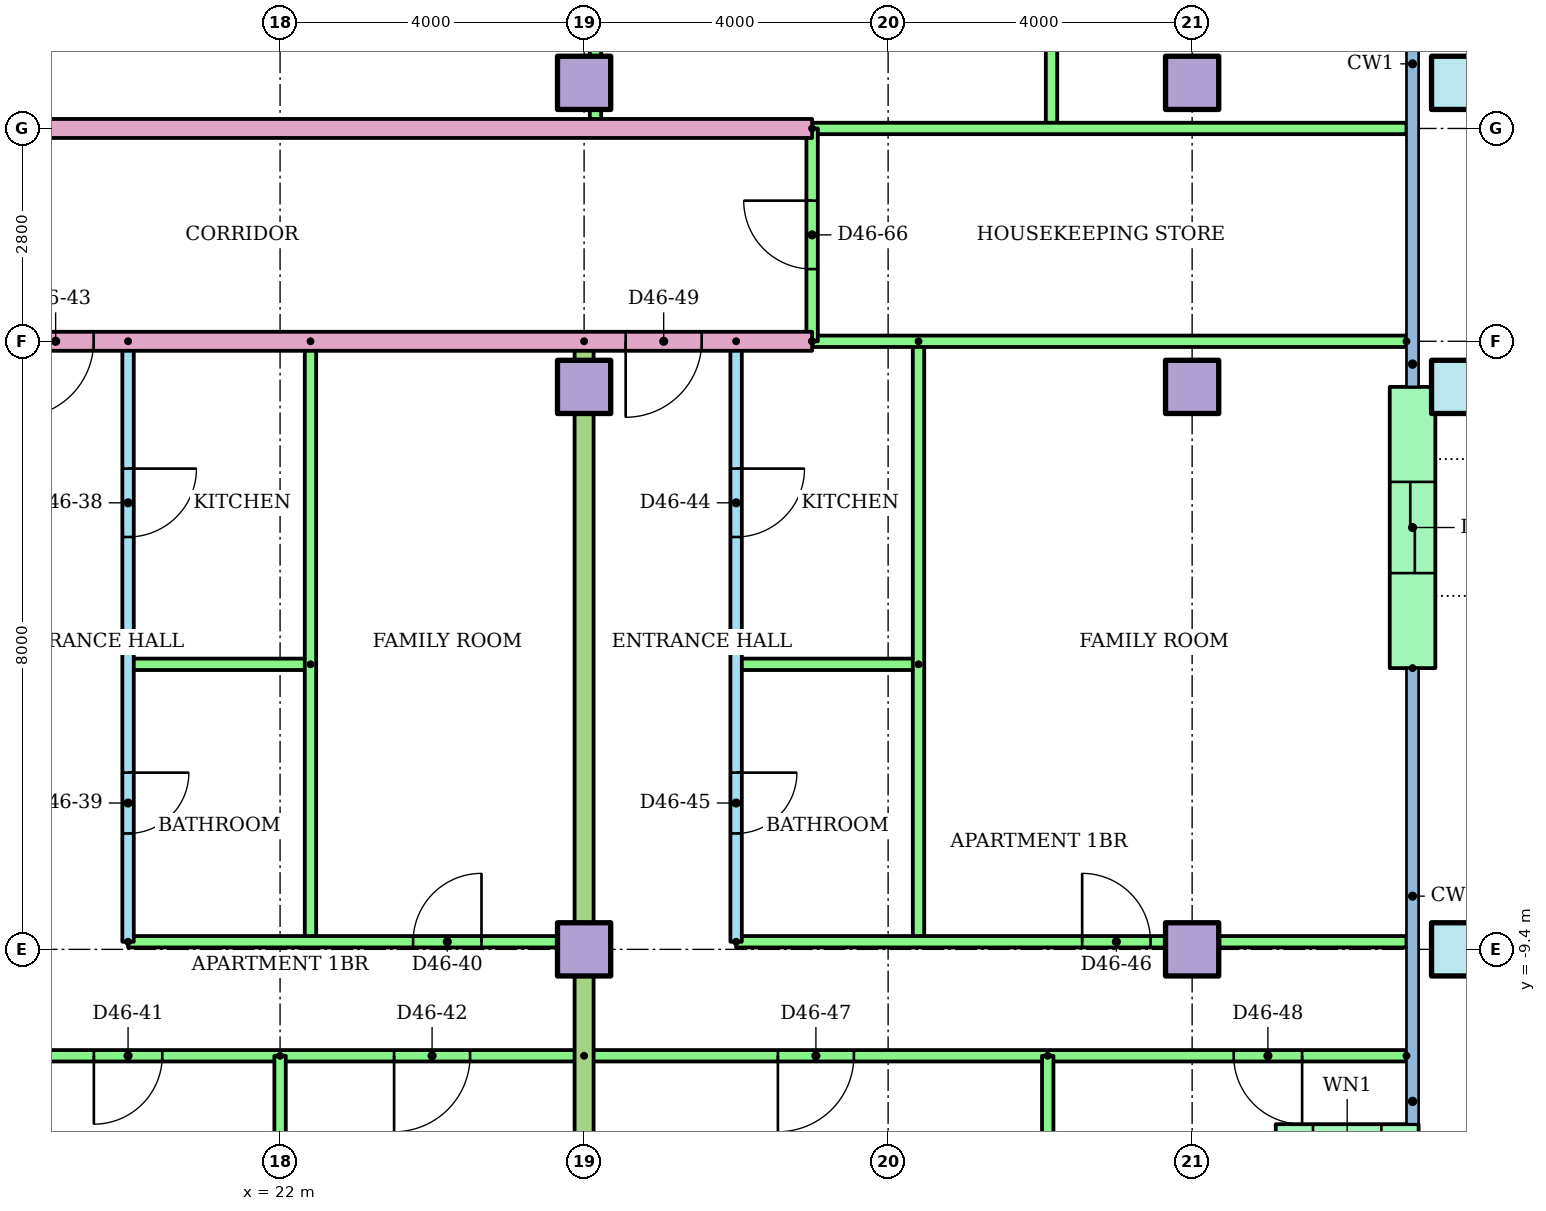
"""IFC4 building model, lengths in metres.
Left out: names, types, materials, properties, quantities, classifications, styles, units other than length and angle.
Written with IfcOpenShell. Run it as: python <this file> out.ifc"""

import sys

from ifc_helpers import new_model, si_unit, direction, frame, frame_2d, origin, origin_2d, place, context, subcontext, project, spatial, rectangle, hollow_rectangle, extrude, element, fill, save


model = new_model("IFC4")
c1 = context("Model", 3, precision=1e-05, world=origin(), true_north=direction((0.0, 1.0)))
c2 = subcontext(c1, "Body", "Model", "MODEL_VIEW")
j1 = project(units=[si_unit("LENGTHUNIT", "METRE"), si_unit("PLANEANGLEUNIT", "RADIAN")], contexts=[c1])
p1 = place(None, origin())
s1 = spatial("IfcSite", under=j1, at=p1, CompositionType="ELEMENT")
p2 = place(p1, origin())
s2 = spatial("IfcBuilding", under=s1, at=p2, CompositionType="ELEMENT")
p3 = place(p2, frame((0.0, 0.0, 178.1)))
s3 = spatial("IfcBuildingStorey", under=s2, at=p3, CompositionType="ELEMENT", Elevation=178.1)
for number, where in (
    (1, (26.0, -9.4, 0.0)),
    (2, (34.0, -9.4, 0.0)),
):
    element("IfcColumn", number, at=place(p3, frame(where)), inside=s3, PredefinedType="COLUMN", context=c2, shape_type="SweptSolid", body=[
        extrude(rectangle(XDim=0.7, YDim=0.7, at=origin_2d()), origin(), (0.0, 0.0, 1.0), 3.2),
    ])
p4 = place(p3, frame((37.5, -9.4, 0.0)))
e3 = element("IfcColumn", 3, at=p4, inside=s3, PredefinedType="COLUMN", context=c2, shape_type="SweptSolid", body=[
    extrude(hollow_rectangle(XDim=0.7, YDim=0.7, WallThickness=0.036, at=origin_2d()), origin(), (0.0, 0.0, 1.0), 3.2),
])
for number, where in (
    (4, (26.0, -2.0, 0.0)),
    (5, (34.0, -2.0, 0.0)),
):
    element("IfcColumn", number, at=place(p3, frame(where)), inside=s3, PredefinedType="COLUMN", context=c2, shape_type="SweptSolid", body=[
        extrude(rectangle(XDim=0.7, YDim=0.7, at=origin_2d()), origin(), (0.0, 0.0, 1.0), 3.2),
    ])
p5 = place(p3, frame((37.5, -2.0, 0.0)))
e6 = element("IfcColumn", 6, at=p5, inside=s3, PredefinedType="COLUMN", context=c2, shape_type="SweptSolid", body=[
    extrude(hollow_rectangle(XDim=0.7, YDim=0.7, WallThickness=0.036, at=origin_2d()), origin(), (0.0, 0.0, 1.0), 3.2),
])
for number, where in (
    (7, (26.0, 2.0, 0.0)),
    (8, (34.0, 2.0, 0.0)),
):
    element("IfcColumn", number, at=place(p3, frame(where)), inside=s3, PredefinedType="COLUMN", context=c2, shape_type="SweptSolid", body=[
        extrude(rectangle(XDim=0.7, YDim=0.7, at=origin_2d()), origin(), (0.0, 0.0, 1.0), 3.2),
    ])
p6 = place(p3, frame((37.5, 2.0, 0.0)))
e9 = element("IfcColumn", 9, at=p6, inside=s3, PredefinedType="COLUMN", context=c2, shape_type="SweptSolid", body=[
    extrude(hollow_rectangle(XDim=0.7, YDim=0.7, WallThickness=0.036, at=origin_2d()), origin(), (0.0, 0.0, 1.0), 3.2),
])
p7 = place(p3, frame((35.1, -12.0, 0.0)))
e10 = element("IfcWall", 10, at=p7, inside=s3, PredefinedType="STANDARD", context=c2, shape_type="SweptSolid", body=[
    extrude(rectangle(XDim=1.88, YDim=0.6, at=frame_2d((0.94, 0.0))), origin(), (0.0, 0.0, 1.0), 2.92),
])
p8 = place(p7, frame((0.49, 0.0, 0.9)))
e11 = element("IfcOpeningElement", 11, at=p8, cuts=e10, PredefinedType="OPENING", context=c2, shape_type="SweptSolid", body=[
    extrude(rectangle(XDim=0.9, YDim=1.5, at=frame_2d((0.45, 0.75))), frame((0.0, 0.31, 0.0), z_axis=(0.0, -1.0, 0.0), x_axis=(1.0, 0.0, 0.0)), (0.0, 0.0, 1.0), 0.62),
])
p9 = place(p3, frame((36.9, -5.7, 0.0), z_axis=(0.0, 0.0, 1.0), x_axis=(0.0, 1.0, 0.0)))
e12 = element("IfcWall", 12, at=p9, inside=s3, PredefinedType="STANDARD", context=c2, shape_type="SweptSolid", body=[
    extrude(rectangle(XDim=3.7, YDim=0.6, at=frame_2d((1.85, 0.0))), origin(), (0.0, 0.0, 1.0), 2.92),
])
p10 = place(p9, frame((1.25, 0.0, 0.0)))
e13 = element("IfcOpeningElement", 13, at=p10, cuts=e12, PredefinedType="OPENING", context=c2, shape_type="SweptSolid", body=[
    extrude(rectangle(XDim=1.2, YDim=2.1, at=frame_2d((0.6, 1.05))), frame((0.0, 0.31, 0.0), z_axis=(0.0, -1.0, 0.0), x_axis=(1.0, 0.0, 0.0)), (0.0, 0.0, 1.0), 0.62),
])
p11 = place(p3, frame((20.0, -1.4, 0.0), z_axis=(0.0, 0.0, 1.0), x_axis=(0.0, -1.0, 0.0)))
e14 = element("IfcWall", 14, at=p11, inside=s3, PredefinedType="PARTITIONING", context=c2, shape_type="SweptSolid", body=[
    extrude(rectangle(XDim=7.9, YDim=0.15, at=frame_2d((3.95, 0.0))), origin(), (0.0, 0.0, 1.0), 2.4),
])
p12 = place(p11, frame((1.675, 0.0, 0.0)))
e15 = element("IfcOpeningElement", 15, at=p12, cuts=e14, PredefinedType="OPENING", context=c2, shape_type="SweptSolid", body=[
    extrude(rectangle(XDim=0.9, YDim=2.1, at=frame_2d((0.45, 1.05))), frame((0.0, 0.085, 0.0), z_axis=(0.0, -1.0, 0.0), x_axis=(1.0, 0.0, 0.0)), (0.0, 0.0, 1.0), 0.17),
])
p13 = place(p11, frame((5.675, 0.0, 0.0)))
e16 = element("IfcOpeningElement", 16, at=p13, cuts=e14, PredefinedType="OPENING", context=c2, shape_type="SweptSolid", body=[
    extrude(rectangle(XDim=0.8, YDim=2.1, at=frame_2d((0.4, 1.05))), frame((0.0, 0.085, 0.0), z_axis=(0.0, -1.0, 0.0), x_axis=(1.0, 0.0, 0.0)), (0.0, 0.0, 1.0), 0.17),
])
p14 = place(p3, frame((22.4, -5.65, 0.0), z_axis=(0.0, 0.0, 1.0), x_axis=(-1.0, 0.0, 0.0)))
e17 = element("IfcWall", 17, at=p14, inside=s3, PredefinedType="PARTITIONING", context=c2, shape_type="SweptSolid", body=[
    extrude(rectangle(XDim=2.4, YDim=0.15, at=frame_2d((1.2, 0.0))), origin(), (0.0, 0.0, 1.0), 2.4),
])
p15 = place(p3, frame((22.4, -1.4, 0.0), z_axis=(0.0, 0.0, 1.0), x_axis=(0.0, -1.0, 0.0)))
e18 = element("IfcWall", 18, at=p15, inside=s3, PredefinedType="PARTITIONING", context=c2, shape_type="SweptSolid", body=[
    extrude(rectangle(XDim=7.9, YDim=0.15, at=frame_2d((3.95, 0.0))), origin(), (0.0, 0.0, 1.0), 2.4),
])
p16 = place(p3, frame((20.0, -9.3, 0.0)))
e19 = element("IfcWall", 19, at=p16, inside=s3, PredefinedType="PARTITIONING", context=c2, shape_type="SweptSolid", body=[
    extrude(rectangle(XDim=6.0, YDim=0.15, at=frame_2d((3.0, 0.0))), origin(), (0.0, 0.0, 1.0), 2.4),
])
p17 = place(p16, frame((3.75, 0.0, 0.0)))
e20 = element("IfcOpeningElement", 20, at=p17, cuts=e19, PredefinedType="OPENING", context=c2, shape_type="SweptSolid", body=[
    extrude(rectangle(XDim=0.9, YDim=2.1, at=frame_2d((0.45, 1.05))), frame((0.0, 0.085, 0.0), z_axis=(0.0, -1.0, 0.0), x_axis=(1.0, 0.0, 0.0)), (0.0, 0.0, 1.0), 0.17),
])
p18 = place(p3, frame((26.0, -10.8, 0.0), z_axis=(0.0, 0.0, 1.0), x_axis=(-1.0, 0.0, 0.0)))
e21 = element("IfcWall", 21, at=p18, inside=s3, PredefinedType="PARTITIONING", context=c2, shape_type="SweptSolid", body=[
    extrude(rectangle(XDim=8.0, YDim=0.15, at=frame_2d((4.0, 0.0))), origin(), (0.0, 0.0, 1.0), 2.4),
])
p19 = place(p18, frame((5.55, 0.0, 0.0)))
e22 = element("IfcOpeningElement", 22, at=p19, cuts=e21, PredefinedType="OPENING", context=c2, shape_type="SweptSolid", body=[
    extrude(rectangle(XDim=0.9, YDim=2.1, at=frame_2d((0.45, 1.05))), frame((0.0, 0.085, 0.0), z_axis=(0.0, -1.0, 0.0), x_axis=(1.0, 0.0, 0.0)), (0.0, 0.0, 1.0), 0.17),
])
p20 = place(p18, frame((1.5, 0.0, 0.0)))
e23 = element("IfcOpeningElement", 23, at=p20, cuts=e21, PredefinedType="OPENING", context=c2, shape_type="SweptSolid", body=[
    extrude(rectangle(XDim=1.0, YDim=2.1, at=frame_2d((0.5, 1.05))), frame((0.0, 0.085, 0.0), z_axis=(0.0, -1.0, 0.0), x_axis=(1.0, 0.0, 0.0)), (0.0, 0.0, 1.0), 0.17),
])
p21 = place(p3, frame((22.0, -10.8, 0.0), z_axis=(0.0, 0.0, 1.0), x_axis=(0.0, -1.0, 0.0)))
e24 = element("IfcWall", 24, at=p21, inside=s3, PredefinedType="PARTITIONING", context=c2, shape_type="SweptSolid", body=[
    extrude(rectangle(XDim=5.621, YDim=0.15, at=frame_2d((2.811, 0.0))), origin(), (0.0, 0.0, 1.0), 2.4),
])
p22 = place(p3, frame((28.0, -1.4, 0.0), z_axis=(0.0, 0.0, 1.0), x_axis=(0.0, -1.0, 0.0)))
e25 = element("IfcWall", 25, at=p22, inside=s3, PredefinedType="PARTITIONING", context=c2, shape_type="SweptSolid", body=[
    extrude(rectangle(XDim=7.9, YDim=0.15, at=frame_2d((3.95, 0.0))), origin(), (0.0, 0.0, 1.0), 2.4),
])
p23 = place(p22, frame((1.675, 0.0, 0.0)))
e26 = element("IfcOpeningElement", 26, at=p23, cuts=e25, PredefinedType="OPENING", context=c2, shape_type="SweptSolid", body=[
    extrude(rectangle(XDim=0.9, YDim=2.1, at=frame_2d((0.45, 1.05))), frame((0.0, 0.085, 0.0), z_axis=(0.0, -1.0, 0.0), x_axis=(1.0, 0.0, 0.0)), (0.0, 0.0, 1.0), 0.17),
])
p24 = place(p22, frame((5.675, 0.0, 0.0)))
e27 = element("IfcOpeningElement", 27, at=p24, cuts=e25, PredefinedType="OPENING", context=c2, shape_type="SweptSolid", body=[
    extrude(rectangle(XDim=0.8, YDim=2.1, at=frame_2d((0.4, 1.05))), frame((0.0, 0.085, 0.0), z_axis=(0.0, -1.0, 0.0), x_axis=(1.0, 0.0, 0.0)), (0.0, 0.0, 1.0), 0.17),
])
p25 = place(p3, frame((30.4, -5.65, 0.0), z_axis=(0.0, 0.0, 1.0), x_axis=(-1.0, 0.0, 0.0)))
e28 = element("IfcWall", 28, at=p25, inside=s3, PredefinedType="PARTITIONING", context=c2, shape_type="SweptSolid", body=[
    extrude(rectangle(XDim=2.4, YDim=0.15, at=frame_2d((1.2, 0.0))), origin(), (0.0, 0.0, 1.0), 2.4),
])
p26 = place(p3, frame((30.4, -1.4, 0.0), z_axis=(0.0, 0.0, 1.0), x_axis=(0.0, -1.0, 0.0)))
e29 = element("IfcWall", 29, at=p26, inside=s3, PredefinedType="PARTITIONING", context=c2, shape_type="SweptSolid", body=[
    extrude(rectangle(XDim=7.9, YDim=0.15, at=frame_2d((3.95, 0.0))), origin(), (0.0, 0.0, 1.0), 2.4),
])
p27 = place(p3, frame((28.0, -9.3, 0.0)))
e30 = element("IfcWall", 30, at=p27, inside=s3, PredefinedType="PARTITIONING", context=c2, shape_type="SweptSolid", body=[
    extrude(rectangle(XDim=8.82, YDim=0.15, at=frame_2d((4.41, 0.0))), origin(), (0.0, 0.0, 1.0), 2.4),
])
p28 = place(p27, frame((4.553, 0.0, 0.0)))
e31 = element("IfcOpeningElement", 31, at=p28, cuts=e30, PredefinedType="OPENING", context=c2, shape_type="SweptSolid", body=[
    extrude(rectangle(XDim=0.9, YDim=2.1, at=frame_2d((0.45, 1.05))), frame((0.0, 0.085, 0.0), z_axis=(0.0, -1.0, 0.0), x_axis=(1.0, 0.0, 0.0)), (0.0, 0.0, 1.0), 0.17),
])
p29 = place(p3, frame((36.82, -10.8, 0.0), z_axis=(0.0, 0.0, 1.0), x_axis=(-1.0, 0.0, 0.0)))
e32 = element("IfcWall", 32, at=p29, inside=s3, PredefinedType="PARTITIONING", context=c2, shape_type="SweptSolid", body=[
    extrude(rectangle(XDim=10.82, YDim=0.15, at=frame_2d((5.41, 0.0))), origin(), (0.0, 0.0, 1.0), 2.4),
])
p30 = place(p29, frame((7.27, 0.0, 0.0)))
e33 = element("IfcOpeningElement", 33, at=p30, cuts=e32, PredefinedType="OPENING", context=c2, shape_type="SweptSolid", body=[
    extrude(rectangle(XDim=1.0, YDim=2.1, at=frame_2d((0.5, 1.05))), frame((0.0, 0.085, 0.0), z_axis=(0.0, -1.0, 0.0), x_axis=(1.0, 0.0, 0.0)), (0.0, 0.0, 1.0), 0.17),
])
p31 = place(p29, frame((1.373, 0.0, 0.0)))
e34 = element("IfcOpeningElement", 34, at=p31, cuts=e32, PredefinedType="OPENING", context=c2, shape_type="SweptSolid", body=[
    extrude(rectangle(XDim=0.9, YDim=2.1, at=frame_2d((0.45, 1.05))), frame((0.0, 0.085, 0.0), z_axis=(0.0, -1.0, 0.0), x_axis=(1.0, 0.0, 0.0)), (0.0, 0.0, 1.0), 0.17),
])
p32 = place(p3, frame((32.1, -10.8, 0.0), z_axis=(0.0, 0.0, 1.0), x_axis=(0.0, -1.0, 0.0)))
e35 = element("IfcWall", 35, at=p32, inside=s3, PredefinedType="PARTITIONING", context=c2, shape_type="SweptSolid", body=[
    extrude(rectangle(XDim=3.82, YDim=0.15, at=frame_2d((1.91, 0.0))), origin(), (0.0, 0.0, 1.0), 2.4),
])
p33 = place(p3, frame((26.0, -1.4, 0.0), z_axis=(0.0, 0.0, 1.0), x_axis=(0.0, -1.0, 0.0)))
e36 = element("IfcWall", 36, at=p33, inside=s3, PredefinedType="PARTITIONING", context=c2, shape_type="SweptSolid", body=[
    extrude(rectangle(XDim=15.01, YDim=0.25, at=frame_2d((7.505, 0.0))), origin(), (0.0, 0.0, 1.0), 2.4),
])
p34 = place(p3, frame((29.0, -1.4, 0.0), z_axis=(0.0, 0.0, 1.0), x_axis=(-1.0, 0.0, 0.0)))
e37 = element("IfcWall", 37, at=p34, inside=s3, PredefinedType="PARTITIONING", context=c2, shape_type="SweptSolid", body=[
    extrude(rectangle(XDim=15.0, YDim=0.25, at=frame_2d((7.5, 0.0))), origin(), (0.0, 0.0, 1.0), 2.4),
])
p35 = place(p34, frame((9.453, 0.0, 0.0)))
e38 = element("IfcOpeningElement", 38, at=p35, cuts=e37, PredefinedType="OPENING", context=c2, shape_type="SweptSolid", body=[
    extrude(rectangle(XDim=1.0, YDim=2.1, at=frame_2d((0.5, 1.05))), frame((0.0, 0.135, 0.0), z_axis=(0.0, -1.0, 0.0), x_axis=(1.0, 0.0, 0.0)), (0.0, 0.0, 1.0), 0.27),
])
p36 = place(p34, frame((1.453, 0.0, 0.0)))
e39 = element("IfcOpeningElement", 39, at=p36, cuts=e37, PredefinedType="OPENING", context=c2, shape_type="SweptSolid", body=[
    extrude(rectangle(XDim=1.0, YDim=2.1, at=frame_2d((0.5, 1.05))), frame((0.0, 0.135, 0.0), z_axis=(0.0, -1.0, 0.0), x_axis=(1.0, 0.0, 0.0)), (0.0, 0.0, 1.0), 0.27),
])
p37 = place(p3, frame((36.82, -1.4, 0.0), z_axis=(0.0, 0.0, 1.0), x_axis=(-1.0, 0.0, 0.0)))
e40 = element("IfcWall", 40, at=p37, inside=s3, PredefinedType="PARTITIONING", context=c2, shape_type="SweptSolid", body=[
    extrude(rectangle(XDim=7.82, YDim=0.15, at=frame_2d((3.91, 0.0))), origin(), (0.0, 0.0, 1.0), 2.4),
])
for number, where, z_axis, x_axis in (
    (41, (26.15, 11.7, 0.0), (0.0, 0.0, 1.0), (0.0, -1.0, 0.0)),
    (42, (32.15, 11.7, 0.0), (0.0, 0.0, 1.0), (0.0, -1.0, 0.0)),
):
    element("IfcWall", number, at=place(p3, frame(where, z_axis=z_axis, x_axis=x_axis)), inside=s3, PredefinedType="PARTITIONING", context=c2, shape_type="SweptSolid", body=[
        extrude(rectangle(XDim=10.3, YDim=0.15, at=frame_2d((5.15, 0.0))), origin(), (0.0, 0.0, 1.0), 2.4),
    ])
p38 = place(p3, frame((14.0, 1.4, 0.0)))
e43 = element("IfcWall", 43, at=p38, inside=s3, PredefinedType="PARTITIONING", context=c2, shape_type="SweptSolid", body=[
    extrude(rectangle(XDim=15.0, YDim=0.25, at=frame_2d((7.5, 0.0))), origin(), (0.0, 0.0, 1.0), 2.4),
])
p39 = place(p38, frame((0.5, 0.0, 0.0)))
e44 = element("IfcOpeningElement", 44, at=p39, cuts=e43, PredefinedType="OPENING", context=c2, shape_type="SweptSolid", body=[
    extrude(rectangle(XDim=1.0, YDim=2.1, at=frame_2d((0.5, 1.05))), frame((0.0, 0.135, 0.0), z_axis=(0.0, -1.0, 0.0), x_axis=(1.0, 0.0, 0.0)), (0.0, 0.0, 1.0), 0.27),
])
p40 = place(p3, frame((29.0, 1.4, 0.0)))
e45 = element("IfcWall", 45, at=p40, inside=s3, PredefinedType="PARTITIONING", context=c2, shape_type="SweptSolid", body=[
    extrude(rectangle(XDim=7.82, YDim=0.15, at=frame_2d((3.91, 0.0))), origin(), (0.0, 0.0, 1.0), 2.4),
])
p41 = place(p3, frame((29.0, -1.4, 0.0), z_axis=(0.0, 0.0, 1.0), x_axis=(0.0, 1.0, 0.0)))
e46 = element("IfcWall", 46, at=p41, inside=s3, PredefinedType="PARTITIONING", context=c2, shape_type="SweptSolid", body=[
    extrude(rectangle(XDim=2.8, YDim=0.15, at=frame_2d((1.4, 0.0))), origin(), (0.0, 0.0, 1.0), 2.4),
])
p42 = place(p41, frame((0.95, 0.0, 0.0)))
e47 = element("IfcOpeningElement", 47, at=p42, cuts=e46, PredefinedType="OPENING", context=c2, shape_type="SweptSolid", body=[
    extrude(rectangle(XDim=0.9, YDim=2.1, at=frame_2d((0.45, 1.05))), frame((0.0, 0.085, 0.0), z_axis=(0.0, -1.0, 0.0), x_axis=(1.0, 0.0, 0.0)), (0.0, 0.0, 1.0), 0.17),
])
p43 = place(p12, origin())
e48 = element("IfcDoor", 48, at=p43, inside=s3, OperationType="SINGLE_SWING_LEFT", PredefinedType="DOOR", context=c2, shape_type="SweptSolid", body=[
    extrude(rectangle(XDim=0.9, YDim=2.1, at=frame_2d((0.45, 1.05))), frame((0.0, 0.025, 0.0), z_axis=(0.0, -1.0, 0.0), x_axis=(1.0, 0.0, 0.0)), (0.0, 0.0, 1.0), 0.05),
])
fill(e15, e48)
p44 = place(p13, origin())
e49 = element("IfcDoor", 49, at=p44, inside=s3, OperationType="SINGLE_SWING_LEFT", PredefinedType="DOOR", context=c2, shape_type="SweptSolid", body=[
    extrude(rectangle(XDim=0.8, YDim=2.1, at=frame_2d((0.4, 1.05))), frame((0.0, 0.025, 0.0), z_axis=(0.0, -1.0, 0.0), x_axis=(1.0, 0.0, 0.0)), (0.0, 0.0, 1.0), 0.05),
])
fill(e16, e49)
p45 = place(p17, origin())
e50 = element("IfcDoor", 50, at=p45, inside=s3, OperationType="SINGLE_SWING_RIGHT", PredefinedType="DOOR", context=c2, shape_type="SweptSolid", body=[
    extrude(rectangle(XDim=0.9, YDim=2.1, at=frame_2d((0.45, 1.05))), frame((0.0, 0.025, 0.0), z_axis=(0.0, -1.0, 0.0), x_axis=(1.0, 0.0, 0.0)), (0.0, 0.0, 1.0), 0.05),
])
fill(e20, e50)
p46 = place(p19, origin())
e51 = element("IfcDoor", 51, at=p46, inside=s3, OperationType="SINGLE_SWING_RIGHT", PredefinedType="DOOR", context=c2, shape_type="SweptSolid", body=[
    extrude(rectangle(XDim=0.9, YDim=2.1, at=frame_2d((0.45, 1.05))), frame((0.0, 0.025, 0.0), z_axis=(0.0, -1.0, 0.0), x_axis=(1.0, 0.0, 0.0)), (0.0, 0.0, 1.0), 0.05),
])
fill(e22, e51)
p47 = place(p20, origin())
e52 = element("IfcDoor", 52, at=p47, inside=s3, OperationType="SINGLE_SWING_RIGHT", PredefinedType="DOOR", context=c2, shape_type="SweptSolid", body=[
    extrude(rectangle(XDim=1.0, YDim=2.1, at=frame_2d((0.5, 1.05))), frame((0.0, 0.025, 0.0), z_axis=(0.0, -1.0, 0.0), x_axis=(1.0, 0.0, 0.0)), (0.0, 0.0, 1.0), 0.05),
])
fill(e23, e52)
p48 = place(p35, origin())
e53 = element("IfcDoor", 53, at=p48, inside=s3, OperationType="SINGLE_SWING_RIGHT", PredefinedType="DOOR", context=c2, shape_type="SweptSolid", body=[
    extrude(rectangle(XDim=1.0, YDim=2.1, at=frame_2d((0.5, 1.05))), frame((0.0, 0.025, 0.0), z_axis=(0.0, -1.0, 0.0), x_axis=(1.0, 0.0, 0.0)), (0.0, 0.0, 1.0), 0.05),
])
fill(e38, e53)
p49 = place(p23, origin())
e54 = element("IfcDoor", 54, at=p49, inside=s3, OperationType="SINGLE_SWING_LEFT", PredefinedType="DOOR", context=c2, shape_type="SweptSolid", body=[
    extrude(rectangle(XDim=0.9, YDim=2.1, at=frame_2d((0.45, 1.05))), frame((0.0, 0.025, 0.0), z_axis=(0.0, -1.0, 0.0), x_axis=(1.0, 0.0, 0.0)), (0.0, 0.0, 1.0), 0.05),
])
fill(e26, e54)
p50 = place(p24, origin())
e55 = element("IfcDoor", 55, at=p50, inside=s3, OperationType="SINGLE_SWING_LEFT", PredefinedType="DOOR", context=c2, shape_type="SweptSolid", body=[
    extrude(rectangle(XDim=0.8, YDim=2.1, at=frame_2d((0.4, 1.05))), frame((0.0, 0.025, 0.0), z_axis=(0.0, -1.0, 0.0), x_axis=(1.0, 0.0, 0.0)), (0.0, 0.0, 1.0), 0.05),
])
fill(e27, e55)
p51 = place(p28, origin())
e56 = element("IfcDoor", 56, at=p51, inside=s3, OperationType="SINGLE_SWING_LEFT", PredefinedType="DOOR", context=c2, shape_type="SweptSolid", body=[
    extrude(rectangle(XDim=0.9, YDim=2.1, at=frame_2d((0.45, 1.05))), frame((0.0, 0.025, 0.0), z_axis=(0.0, -1.0, 0.0), x_axis=(1.0, 0.0, 0.0)), (0.0, 0.0, 1.0), 0.05),
])
fill(e31, e56)
p52 = place(p30, origin())
e57 = element("IfcDoor", 57, at=p52, inside=s3, OperationType="SINGLE_SWING_RIGHT", PredefinedType="DOOR", context=c2, shape_type="SweptSolid", body=[
    extrude(rectangle(XDim=1.0, YDim=2.1, at=frame_2d((0.5, 1.05))), frame((0.0, 0.025, 0.0), z_axis=(0.0, -1.0, 0.0), x_axis=(1.0, 0.0, 0.0)), (0.0, 0.0, 1.0), 0.05),
])
fill(e33, e57)
p53 = place(p31, origin())
e58 = element("IfcDoor", 58, at=p53, inside=s3, OperationType="SINGLE_SWING_LEFT", PredefinedType="DOOR", context=c2, shape_type="SweptSolid", body=[
    extrude(rectangle(XDim=0.9, YDim=2.1, at=frame_2d((0.45, 1.05))), frame((0.0, 0.025, 0.0), z_axis=(0.0, -1.0, 0.0), x_axis=(1.0, 0.0, 0.0)), (0.0, 0.0, 1.0), 0.05),
])
fill(e34, e58)
p54 = place(p36, origin())
e59 = element("IfcDoor", 59, at=p54, inside=s3, OperationType="SINGLE_SWING_RIGHT", PredefinedType="DOOR", context=c2, shape_type="SweptSolid", body=[
    extrude(rectangle(XDim=1.0, YDim=2.1, at=frame_2d((0.5, 1.05))), frame((0.0, 0.025, 0.0), z_axis=(0.0, -1.0, 0.0), x_axis=(1.0, 0.0, 0.0)), (0.0, 0.0, 1.0), 0.05),
])
fill(e39, e59)
p55 = place(p42, origin())
e60 = element("IfcDoor", 60, at=p55, inside=s3, OperationType="SINGLE_SWING_RIGHT", PredefinedType="DOOR", context=c2, shape_type="SweptSolid", body=[
    extrude(rectangle(XDim=0.9, YDim=2.1, at=frame_2d((0.45, 1.05))), frame((0.0, 0.025, 0.0), z_axis=(0.0, -1.0, 0.0), x_axis=(1.0, 0.0, 0.0)), (0.0, 0.0, 1.0), 0.05),
])
fill(e47, e60)
p56 = place(p10, origin())
e61 = element("IfcDoor", 61, at=p56, inside=s3, OperationType="SLIDING_TO_LEFT", PredefinedType="DOOR", context=c2, shape_type="SweptSolid", body=[
    extrude(rectangle(XDim=1.2, YDim=2.1, at=frame_2d((0.6, 1.05))), frame((0.0, 0.025, 0.0), z_axis=(0.0, -1.0, 0.0), x_axis=(1.0, 0.0, 0.0)), (0.0, 0.0, 1.0), 0.05),
])
fill(e13, e61)
save(model, sys.argv[1])
